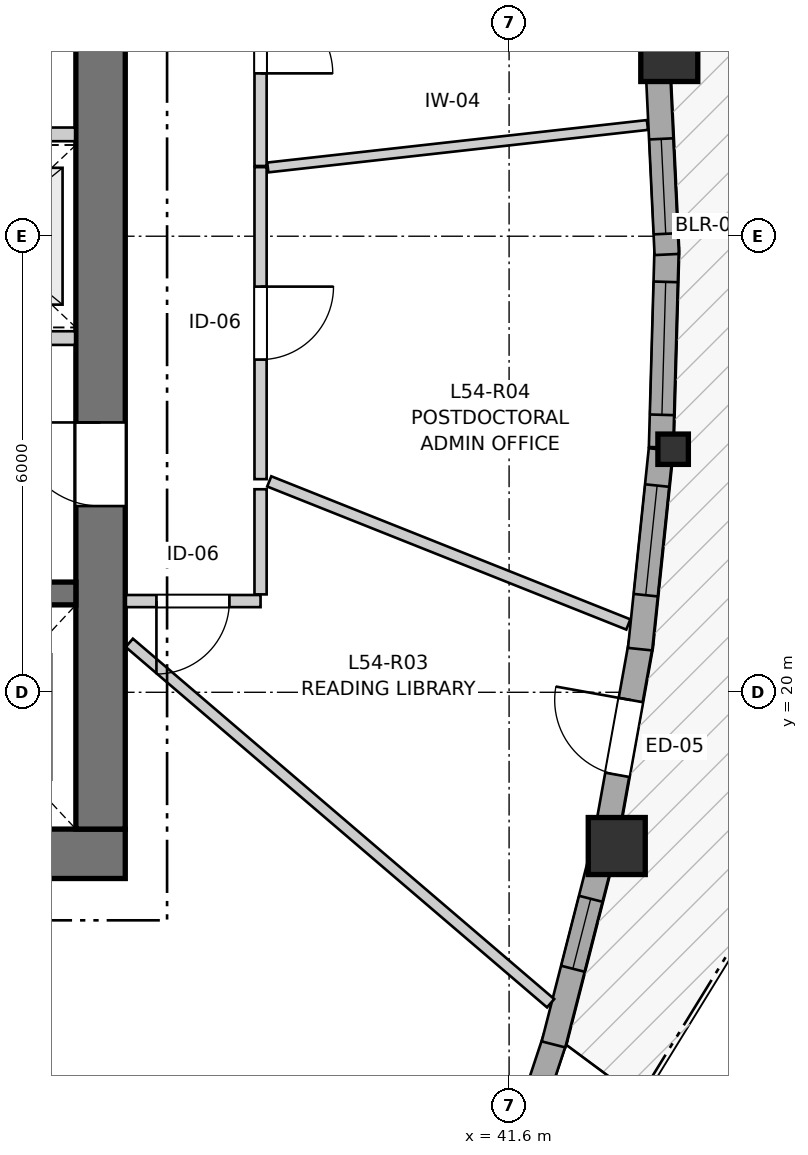
"""IFC4 building model, lengths in metres.
Left out: names, types, materials, properties, quantities, classifications, styles, units other than length and angle.
Written with IfcOpenShell. Run it as: python <this file> out.ifc"""

import sys

from ifc_helpers import new_model, si_unit, direction, frame, frame_2d, origin, origin_2d, place, context, subcontext, project, spatial, rectangle, i_section, extrude, source, transform, mapped, element, fill, save


model = new_model("IFC4")
c1 = context("Model", 3, precision=1e-05, world=origin(), true_north=direction((0.0, 1.0)))
c2 = subcontext(c1, "Body", "Model", "MODEL_VIEW")
j1 = project(units=[si_unit("LENGTHUNIT", "METRE"), si_unit("PLANEANGLEUNIT", "RADIAN")], contexts=[c1])
p1 = place(None, origin())
s1 = spatial("IfcSite", under=j1, at=p1, CompositionType="ELEMENT")
p2 = place(p1, origin())
s2 = spatial("IfcBuilding", under=s1, at=p2, CompositionType="ELEMENT")
p3 = place(p2, frame((0.0, 0.0, 181.0)))
s3 = spatial("IfcBuildingStorey", under=s2, at=p3, CompositionType="ELEMENT", Elevation=181.0)
p4 = place(p3, frame((24.15, 17.875, 0.0), z_axis=(0.0, 0.0, 1.0), x_axis=(1.0, 0.0, 0.0)))
e1 = element("IfcWall", 1, at=p4, inside=s3, PredefinedType="SHEAR", context=c2, shape_type="SweptSolid", body=[
    extrude(rectangle(XDim=12.4, YDim=0.65, at=frame_2d((6.2, 0.0))), origin(), (0.0, 0.0, 1.0), 2.95),
])
p5 = place(p3, frame((36.225, 18.2, 0.0), z_axis=(0.0, 0.0, 1.0), x_axis=(0.0, 1.0, 0.0)))
e2 = element("IfcWall", 2, at=p5, inside=s3, PredefinedType="SHEAR", context=c2, shape_type="SweptSolid", body=[
    extrude(rectangle(XDim=15.6, YDim=0.65, at=frame_2d((7.8, 0.0))), origin(), (0.0, 0.0, 1.0), 2.95),
])
p6 = place(p5, frame((4.25, 0.0, 0.0)))
e3 = element("IfcOpeningElement", 3, at=p6, cuts=e2, PredefinedType="OPENING", context=c2, shape_type="SweptSolid", body=[
    extrude(rectangle(XDim=1.1, YDim=2.15, at=frame_2d((0.55, 1.075))), frame((0.0, 0.335, 0.0), z_axis=(0.0, -1.0, 0.0), x_axis=(1.0, 0.0, 0.0)), (0.0, 0.0, 1.0), 0.67),
])
p7 = place(p5, frame((10.25, 0.0, 0.0)))
e4 = element("IfcOpeningElement", 4, at=p7, cuts=e2, PredefinedType="OPENING", context=c2, shape_type="SweptSolid", body=[
    extrude(rectangle(XDim=1.1, YDim=2.15, at=frame_2d((0.55, 1.075))), frame((0.0, 0.335, 0.0), z_axis=(0.0, -1.0, 0.0), x_axis=(1.0, 0.0, 0.0)), (0.0, 0.0, 1.0), 0.67),
])
p8 = place(p3, frame((24.8, 21.3, 0.0), z_axis=(0.0, 0.0, 1.0), x_axis=(1.0, 0.0, 0.0)))
e5 = element("IfcWall", 5, at=p8, inside=s3, PredefinedType="SHEAR", context=c2, shape_type="SweptSolid", body=[
    extrude(rectangle(XDim=11.1, YDim=0.3, at=frame_2d((5.55, 0.0))), origin(), (0.0, 0.0, 1.0), 2.95),
])
p9 = place(p8, frame((6.22, 0.0, 0.0)))
e6 = element("IfcOpeningElement", 6, at=p9, cuts=e5, PredefinedType="OPENING", context=c2, shape_type="SweptSolid", body=[
    extrude(rectangle(XDim=0.98, YDim=2.15, at=frame_2d((0.49, 1.075))), frame((0.0, 0.16, 0.0), z_axis=(0.0, -1.0, 0.0), x_axis=(1.0, 0.0, 0.0)), (0.0, 0.0, 1.0), 0.32),
])
p10 = place(p8, frame((9.15, 0.0, 0.0)))
e7 = element("IfcOpeningElement", 7, at=p10, cuts=e5, PredefinedType="OPENING", context=c2, shape_type="SweptSolid", body=[
    extrude(rectangle(XDim=1.15, YDim=2.15, at=frame_2d((0.575, 1.075))), frame((0.0, 0.16, 0.0), z_axis=(0.0, -1.0, 0.0), x_axis=(1.0, 0.0, 0.0)), (0.0, 0.0, 1.0), 0.32),
])
m1 = source(origin(), c2, "Body", "SweptSolid", [
    extrude(rectangle(XDim=0.75, YDim=0.75, at=origin_2d()), origin(), (0.0, 0.0, 1.0), 2.95),
])
p11 = place(p3, frame((43.017, 17.977, 0.0), z_axis=(0.0, 0.0, 1.0), x_axis=(1.0, 0.0, 0.0)))
e8 = element("IfcColumn", 8, at=p11, inside=s3, PredefinedType="COLUMN", context=c2, shape_type="MappedRepresentation", body=[
    mapped(m1, transform((0.0, 0.0, 0.0), x_axis=(1.0, 0.0, 0.0), y_axis=(0.0, 1.0, 0.0), z_axis=(0.0, 0.0, 1.0), scale=1.0)),
])
m2 = source(origin(), c2, "Body", "SweptSolid", [
    extrude(i_section(OverallWidth=0.401, OverallDepth=0.399, WebThickness=0.023, FlangeThickness=0.036, FilletRadius=0.015, at=origin_2d()), origin(), (0.0, 0.0, 1.0), 2.95),
])
p12 = place(p3, frame((43.758, 23.198, 0.0), z_axis=(0.0, 0.0, 1.0), x_axis=(1.0, 0.0, 0.0)))
e9 = element("IfcColumn", 9, at=p12, inside=s3, PredefinedType="PILASTER", context=c2, shape_type="MappedRepresentation", body=[
    mapped(m2, transform((0.0, 0.0, 0.0), x_axis=(1.0, 0.0, 0.0), y_axis=(0.0, 1.0, 0.0), z_axis=(0.0, 0.0, 1.0), scale=1.0)),
])
p13 = place(p3, frame((43.708, 28.41, 0.0), z_axis=(0.0, 0.0, 1.0), x_axis=(1.0, 0.0, 0.0)))
e10 = element("IfcColumn", 10, at=p13, inside=s3, PredefinedType="COLUMN", context=c2, shape_type="MappedRepresentation", body=[
    mapped(m1, transform((0.0, 0.0, 0.0), x_axis=(1.0, 0.0, 0.0), y_axis=(0.0, 1.0, 0.0), z_axis=(0.0, 0.0, 1.0), scale=1.0)),
])
p14 = place(p3, frame((41.337, 12.819, 0.0), z_axis=(0.0, 0.0, 1.0), x_axis=(0.31443095402, 0.949280345922, 0.0)))
e11 = element("IfcWall", 11, at=p14, inside=s3, PredefinedType="SOLIDWALL", context=c2, shape_type="SweptSolid", body=[
    extrude(rectangle(XDim=2.773, YDim=0.32, at=frame_2d((1.386, 0.0))), origin(), (0.0, 0.0, 1.0), 2.53),
])
p15 = place(p14, frame((0.676, 0.0, 0.82)))
e12 = element("IfcOpeningElement", 12, at=p15, cuts=e11, PredefinedType="OPENING", context=c2, shape_type="SweptSolid", body=[
    extrude(rectangle(XDim=1.4, YDim=1.35, at=frame_2d((0.7, 0.675))), frame((0.0, 0.17, 0.0), z_axis=(0.0, -1.0, 0.0), x_axis=(1.0, 0.0, 0.0)), (0.0, 0.0, 1.0), 0.34),
])
p16 = place(p3, frame((42.184, 15.367, 0.0), z_axis=(0.0, 0.0, 1.0), x_axis=(0.247650778908, 0.968849364817, 0.0)))
e13 = element("IfcWall", 13, at=p16, inside=s3, PredefinedType="SOLIDWALL", context=c2, shape_type="SweptSolid", body=[
    extrude(rectangle(XDim=2.57, YDim=0.32, at=frame_2d((1.285, 0.0))), origin(), (0.0, 0.0, 1.0), 2.53),
])
p17 = place(p16, frame((1.028, 0.0, 0.82)))
e14 = element("IfcOpeningElement", 14, at=p17, cuts=e13, PredefinedType="OPENING", context=c2, shape_type="SweptSolid", body=[
    extrude(rectangle(XDim=0.95, YDim=1.35, at=frame_2d((0.475, 0.675))), frame((0.0, 0.17, 0.0), z_axis=(0.0, -1.0, 0.0), x_axis=(1.0, 0.0, 0.0)), (0.0, 0.0, 1.0), 0.34),
])
p18 = place(p3, frame((42.888, 18.168, 0.0), z_axis=(0.0, 0.0, 1.0), x_axis=(0.177158615295, 0.984182312901, 0.0)))
e15 = element("IfcWall", 15, at=p18, inside=s3, PredefinedType="SOLIDWALL", context=c2, shape_type="SweptSolid", body=[
    extrude(rectangle(XDim=2.526, YDim=0.32, at=frame_2d((1.263, 0.0))), origin(), (0.0, 0.0, 1.0), 2.53),
])
p19 = place(p18, frame((0.758, 0.0, 0.0)))
e16 = element("IfcOpeningElement", 16, at=p19, cuts=e15, PredefinedType="OPENING", context=c2, shape_type="SweptSolid", body=[
    extrude(rectangle(XDim=1.0, YDim=2.1, at=frame_2d((0.5, 1.05))), frame((0.0, 0.17, 0.0), z_axis=(0.0, -1.0, 0.0), x_axis=(1.0, 0.0, 0.0)), (0.0, 0.0, 1.0), 0.34),
])
p20 = place(p3, frame((43.323, 20.567, 0.0), z_axis=(0.0, 0.0, 1.0), x_axis=(0.10362132496, 0.9946168212, 0.0)))
e17 = element("IfcWall", 17, at=p20, inside=s3, PredefinedType="SOLIDWALL", context=c2, shape_type="SweptSolid", body=[
    extrude(rectangle(XDim=2.641, YDim=0.32, at=frame_2d((1.321, 0.0))), origin(), (0.0, 0.0, 1.0), 2.53),
])
p21 = place(p20, frame((0.714, 0.0, 0.82)))
e18 = element("IfcOpeningElement", 18, at=p21, cuts=e17, PredefinedType="OPENING", context=c2, shape_type="SweptSolid", body=[
    extrude(rectangle(XDim=1.45, YDim=1.25, at=frame_2d((0.725, 0.625))), frame((0.0, 0.17, 0.0), z_axis=(0.0, -1.0, 0.0), x_axis=(1.0, 0.0, 0.0)), (0.0, 0.0, 1.0), 0.34),
])
p22 = place(p3, frame((43.599, 23.222, 0.0), z_axis=(0.0, 0.0, 1.0), x_axis=(0.028259888897, 0.999600609583, 0.0)))
e19 = element("IfcWall", 19, at=p22, inside=s3, PredefinedType="SOLIDWALL", context=c2, shape_type="SweptSolid", body=[
    extrude(rectangle(XDim=2.626, YDim=0.32, at=frame_2d((1.313, 0.0))), origin(), (0.0, 0.0, 1.0), 2.53),
])
p23 = place(p22, frame((0.428, 0.0, 0.82)))
e20 = element("IfcOpeningElement", 20, at=p23, cuts=e19, PredefinedType="OPENING", context=c2, shape_type="SweptSolid", body=[
    extrude(rectangle(XDim=1.75, YDim=1.3, at=frame_2d((0.875, 0.65))), frame((0.0, 0.17, 0.0), z_axis=(0.0, -1.0, 0.0), x_axis=(1.0, 0.0, 0.0)), (0.0, 0.0, 1.0), 0.34),
])
p24 = place(p3, frame((43.674, 25.76, 0.0), z_axis=(0.0, 0.0, 1.0), x_axis=(-0.047621245569, 0.9988654649, 0.0)))
e21 = element("IfcWall", 21, at=p24, inside=s3, PredefinedType="SOLIDWALL", context=c2, shape_type="SweptSolid", body=[
    extrude(rectangle(XDim=2.481, YDim=0.32, at=frame_2d((1.241, 0.0))), origin(), (0.0, 0.0, 1.0), 2.53),
])
p25 = place(p24, frame((0.273, 0.0, 0.82)))
e22 = element("IfcOpeningElement", 22, at=p25, cuts=e21, PredefinedType="OPENING", context=c2, shape_type="SweptSolid", body=[
    extrude(rectangle(XDim=1.25, YDim=1.35, at=frame_2d((0.625, 0.675))), frame((0.0, 0.17, 0.0), z_axis=(0.0, -1.0, 0.0), x_axis=(1.0, 0.0, 0.0)), (0.0, 0.0, 1.0), 0.34),
])
p26 = place(p3, frame((30.67, 24.66, 0.0), z_axis=(0.0, 0.0, 1.0), x_axis=(1.0, 0.0, 0.0)))
e23 = element("IfcWall", 23, at=p26, inside=s3, PredefinedType="PARTITIONING", context=c2, shape_type="SweptSolid", body=[
    extrude(rectangle(XDim=5.22, YDim=0.18, at=frame_2d((2.61, 0.0))), origin(), (0.0, 0.0, 1.0), 2.95),
])
p27 = place(p26, frame((0.68, 0.0, 0.0)))
e24 = element("IfcOpeningElement", 24, at=p27, cuts=e23, PredefinedType="OPENING", context=c2, shape_type="SweptSolid", body=[
    extrude(rectangle(XDim=0.98, YDim=2.15, at=frame_2d((0.49, 1.075))), frame((0.0, 0.1, 0.0), z_axis=(0.0, -1.0, 0.0), x_axis=(1.0, 0.0, 0.0)), (0.0, 0.0, 1.0), 0.2),
])
p28 = place(p3, frame((30.67, 27.34, 0.0), z_axis=(0.0, 0.0, 1.0), x_axis=(1.0, 0.0, 0.0)))
e25 = element("IfcWall", 25, at=p28, inside=s3, PredefinedType="PARTITIONING", context=c2, shape_type="SweptSolid", body=[
    extrude(rectangle(XDim=5.22, YDim=0.18, at=frame_2d((2.61, 0.0))), origin(), (0.0, 0.0, 1.0), 2.95),
])
p29 = place(p28, frame((0.68, 0.0, 0.0)))
e26 = element("IfcOpeningElement", 26, at=p29, cuts=e25, PredefinedType="OPENING", context=c2, shape_type="SweptSolid", body=[
    extrude(rectangle(XDim=0.98, YDim=2.15, at=frame_2d((0.49, 1.075))), frame((0.0, 0.1, 0.0), z_axis=(0.0, -1.0, 0.0), x_axis=(1.0, 0.0, 0.0)), (0.0, 0.0, 1.0), 0.2),
])
p30 = place(p3, frame((38.33, 26.909, 0.0), z_axis=(0.0, 0.0, 1.0), x_axis=(0.0, -1.0, 0.0)))
e27 = element("IfcWall", 27, at=p30, inside=s3, PredefinedType="PARTITIONING", context=c2, shape_type="SweptSolid", body=[
    extrude(rectangle(XDim=4.105, YDim=0.16, at=frame_2d((2.052, 0.0))), origin(), (0.0, 0.0, 1.0), 2.95),
])
p31 = place(p30, frame((1.572, 0.0, 0.0)))
e28 = element("IfcOpeningElement", 28, at=p31, cuts=e27, PredefinedType="OPENING", context=c2, shape_type="SweptSolid", body=[
    extrude(rectangle(XDim=0.96, YDim=2.1, at=frame_2d((0.48, 1.05))), frame((0.0, 0.09, 0.0), z_axis=(0.0, -1.0, 0.0), x_axis=(1.0, 0.0, 0.0)), (0.0, 0.0, 1.0), 0.18),
])
p32 = place(p3, frame((38.33, 30.309, 0.0), z_axis=(0.0, 0.0, 1.0), x_axis=(0.0, -1.0, 0.0)))
e29 = element("IfcWall", 29, at=p32, inside=s3, PredefinedType="PARTITIONING", context=c2, shape_type="SweptSolid", body=[
    extrude(rectangle(XDim=3.385, YDim=0.16, at=frame_2d((1.692, 0.0))), origin(), (0.0, 0.0, 1.0), 2.95),
])
p33 = place(p32, frame((1.217, 0.0, 0.0)))
e30 = element("IfcOpeningElement", 30, at=p33, cuts=e29, PredefinedType="OPENING", context=c2, shape_type="SweptSolid", body=[
    extrude(rectangle(XDim=0.95, YDim=2.1, at=frame_2d((0.475, 1.05))), frame((0.0, 0.09, 0.0), z_axis=(0.0, -1.0, 0.0), x_axis=(1.0, 0.0, 0.0)), (0.0, 0.0, 1.0), 0.18),
])
p34 = place(p3, frame((38.33, 21.2, 0.0), z_axis=(0.0, 0.0, 1.0), x_axis=(-1.0, 0.0, 0.0)))
e31 = element("IfcWall", 31, at=p34, inside=s3, PredefinedType="PARTITIONING", context=c2, shape_type="SweptSolid", body=[
    extrude(rectangle(XDim=1.772, YDim=0.16, at=frame_2d((0.886, 0.0))), origin(), (0.0, 0.0, 1.0), 2.95),
])
p35 = place(p34, frame((0.41, 0.0, 0.0)))
e32 = element("IfcOpeningElement", 32, at=p35, cuts=e31, PredefinedType="OPENING", context=c2, shape_type="SweptSolid", body=[
    extrude(rectangle(XDim=0.96, YDim=2.1, at=frame_2d((0.48, 1.05))), frame((0.0, 0.09, 0.0), z_axis=(0.0, -1.0, 0.0), x_axis=(1.0, 0.0, 0.0)), (0.0, 0.0, 1.0), 0.18),
])
p36 = place(p3, frame((36.603, 20.65, 0.0), z_axis=(0.0, 0.0, 1.0), x_axis=(0.759924803985, -0.650010993975, 0.0)))
e33 = element("IfcWall", 33, at=p36, inside=s3, PredefinedType="PARTITIONING", context=c2, shape_type="SweptSolid", body=[
    extrude(rectangle(XDim=7.294, YDim=0.145, at=frame_2d((3.647, 0.0))), origin(), (0.0, 0.0, 1.0), 2.95),
])
p37 = place(p3, frame((38.444, 22.774, 0.0), z_axis=(0.0, 0.0, 1.0), x_axis=(0.928995588187, -0.37009079579, 0.0)))
e34 = element("IfcWall", 34, at=p37, inside=s3, PredefinedType="PARTITIONING", context=c2, shape_type="SweptSolid", body=[
    extrude(rectangle(XDim=5.085, YDim=0.145, at=frame_2d((2.543, 0.0))), origin(), (0.0, 0.0, 1.0), 2.95),
])
p38 = place(p3, frame((38.425, 26.905, 0.0), z_axis=(0.0, 0.0, 1.0), x_axis=(0.993793959726, 0.111236530025, 0.0)))
e35 = element("IfcWall", 35, at=p38, inside=s3, PredefinedType="PARTITIONING", context=c2, shape_type="SweptSolid", body=[
    extrude(rectangle(XDim=5.026, YDim=0.13, at=frame_2d((2.513, 0.0))), origin(), (0.0, 0.0, 1.0), 2.95),
])
p39 = place(p3, frame((38.33, 21.288, 0.0), z_axis=(0.0, 0.0, 1.0), x_axis=(0.0, 1.0, 0.0)))
e36 = element("IfcWall", 36, at=p39, inside=s3, PredefinedType="PARTITIONING", context=c2, shape_type="SweptSolid", body=[
    extrude(rectangle(XDim=1.383, YDim=0.16, at=frame_2d((0.691, 0.0))), origin(), (0.0, 0.0, 1.0), 2.95),
])
m3 = source(origin(), c2, "Body", "SweptSolid", [
    extrude(rectangle(XDim=0.95, YDim=1.35, at=frame_2d((0.475, 0.675))), frame((0.0, 0.03, 0.0), z_axis=(0.0, -1.0, 0.0), x_axis=(1.0, 0.0, 0.0)), (0.0, 0.0, 1.0), 0.06),
])
p40 = place(p17, origin())
e37 = element("IfcWindow", 37, at=p40, inside=s3, PartitioningType="SINGLE_PANEL", PredefinedType="WINDOW", context=c2, shape_type="MappedRepresentation", body=[
    mapped(m3, transform((0.0, 0.0, 0.0), x_axis=(1.0, 0.0, 0.0), y_axis=(0.0, 1.0, 0.0), z_axis=(0.0, 0.0, 1.0), scale=1.0)),
])
fill(e14, e37)
m4 = source(origin(), c2, "Body", "SweptSolid", [
    extrude(rectangle(XDim=1.0, YDim=2.1, at=frame_2d((0.5, 1.05))), frame((0.0, 0.025, 0.0), z_axis=(0.0, -1.0, 0.0), x_axis=(1.0, 0.0, 0.0)), (0.0, 0.0, 1.0), 0.05),
])
p41 = place(p19, origin())
e38 = element("IfcDoor", 38, at=p41, inside=s3, OperationType="SINGLE_SWING_RIGHT", PredefinedType="DOOR", context=c2, shape_type="MappedRepresentation", body=[
    mapped(m4, transform((0.0, 0.0, 0.0), x_axis=(1.0, 0.0, 0.0), y_axis=(0.0, 1.0, 0.0), z_axis=(0.0, 0.0, 1.0), scale=1.0)),
])
fill(e16, e38)
m5 = source(origin(), c2, "Body", "SweptSolid", [
    extrude(rectangle(XDim=1.45, YDim=1.25, at=frame_2d((0.725, 0.625))), frame((0.0, 0.03, 0.0), z_axis=(0.0, -1.0, 0.0), x_axis=(1.0, 0.0, 0.0)), (0.0, 0.0, 1.0), 0.06),
])
p42 = place(p21, origin())
e39 = element("IfcWindow", 39, at=p42, inside=s3, PartitioningType="SINGLE_PANEL", PredefinedType="WINDOW", context=c2, shape_type="MappedRepresentation", body=[
    mapped(m5, transform((0.0, 0.0, 0.0), x_axis=(1.0, 0.0, 0.0), y_axis=(0.0, 1.0, 0.0), z_axis=(0.0, 0.0, 1.0), scale=1.0)),
])
fill(e18, e39)
m6 = source(origin(), c2, "Body", "SweptSolid", [
    extrude(rectangle(XDim=1.75, YDim=1.3, at=frame_2d((0.875, 0.65))), frame((0.0, 0.03, 0.0), z_axis=(0.0, -1.0, 0.0), x_axis=(1.0, 0.0, 0.0)), (0.0, 0.0, 1.0), 0.06),
])
p43 = place(p23, origin())
e40 = element("IfcWindow", 40, at=p43, inside=s3, PartitioningType="SINGLE_PANEL", PredefinedType="WINDOW", context=c2, shape_type="MappedRepresentation", body=[
    mapped(m6, transform((0.0, 0.0, 0.0), x_axis=(1.0, 0.0, 0.0), y_axis=(0.0, 1.0, 0.0), z_axis=(0.0, 0.0, 1.0), scale=1.0)),
])
fill(e20, e40)
m7 = source(origin(), c2, "Body", "SweptSolid", [
    extrude(rectangle(XDim=1.25, YDim=1.35, at=frame_2d((0.625, 0.675))), frame((0.0, 0.03, 0.0), z_axis=(0.0, -1.0, 0.0), x_axis=(1.0, 0.0, 0.0)), (0.0, 0.0, 1.0), 0.06),
])
p44 = place(p25, origin())
e41 = element("IfcWindow", 41, at=p44, inside=s3, PartitioningType="SINGLE_PANEL", PredefinedType="WINDOW", context=c2, shape_type="MappedRepresentation", body=[
    mapped(m7, transform((0.0, 0.0, 0.0), x_axis=(1.0, 0.0, 0.0), y_axis=(0.0, 1.0, 0.0), z_axis=(0.0, 0.0, 1.0), scale=1.0)),
])
fill(e22, e41)
m8 = source(origin(), c2, "Body", "SweptSolid", [
    extrude(rectangle(XDim=1.1, YDim=2.15, at=frame_2d((0.55, 1.075))), frame((0.0, 0.025, 0.0), z_axis=(0.0, -1.0, 0.0), x_axis=(1.0, 0.0, 0.0)), (0.0, 0.0, 1.0), 0.05),
])
p45 = place(p6, origin())
e42 = element("IfcDoor", 42, at=p45, inside=s3, OperationType="SINGLE_SWING_RIGHT", PredefinedType="DOOR", context=c2, shape_type="MappedRepresentation", body=[
    mapped(m8, transform((0.0, 0.0, 0.0), x_axis=(1.0, 0.0, 0.0), y_axis=(0.0, 1.0, 0.0), z_axis=(0.0, 0.0, 1.0), scale=1.0)),
])
fill(e3, e42)
m9 = source(origin(), c2, "Body", "SweptSolid", [
    extrude(rectangle(XDim=0.96, YDim=2.1, at=frame_2d((0.48, 1.05))), frame((0.0, 0.025, 0.0), z_axis=(0.0, -1.0, 0.0), x_axis=(1.0, 0.0, 0.0)), (0.0, 0.0, 1.0), 0.05),
])
p46 = place(p31, origin())
e43 = element("IfcDoor", 43, at=p46, inside=s3, OperationType="SINGLE_SWING_LEFT", PredefinedType="DOOR", context=c2, shape_type="MappedRepresentation", body=[
    mapped(m9, transform((0.0, 0.0, 0.0), x_axis=(1.0, 0.0, 0.0), y_axis=(0.0, 1.0, 0.0), z_axis=(0.0, 0.0, 1.0), scale=1.0)),
])
fill(e28, e43)
m10 = source(origin(), c2, "Body", "SweptSolid", [
    extrude(rectangle(XDim=0.95, YDim=2.1, at=frame_2d((0.475, 1.05))), frame((0.0, 0.025, 0.0), z_axis=(0.0, -1.0, 0.0), x_axis=(1.0, 0.0, 0.0)), (0.0, 0.0, 1.0), 0.05),
])
p47 = place(p33, origin())
e44 = element("IfcDoor", 44, at=p47, inside=s3, OperationType="SINGLE_SWING_RIGHT", PredefinedType="DOOR", context=c2, shape_type="MappedRepresentation", body=[
    mapped(m10, transform((0.0, 0.0, 0.0), x_axis=(1.0, 0.0, 0.0), y_axis=(0.0, 1.0, 0.0), z_axis=(0.0, 0.0, 1.0), scale=1.0)),
])
fill(e30, e44)
p48 = place(p35, origin())
e45 = element("IfcDoor", 45, at=p48, inside=s3, OperationType="SINGLE_SWING_RIGHT", PredefinedType="DOOR", context=c2, shape_type="MappedRepresentation", body=[
    mapped(m9, transform((0.0, 0.0, 0.0), x_axis=(1.0, 0.0, 0.0), y_axis=(0.0, 1.0, 0.0), z_axis=(0.0, 0.0, 1.0), scale=1.0)),
])
fill(e32, e45)
save(model, sys.argv[1])
